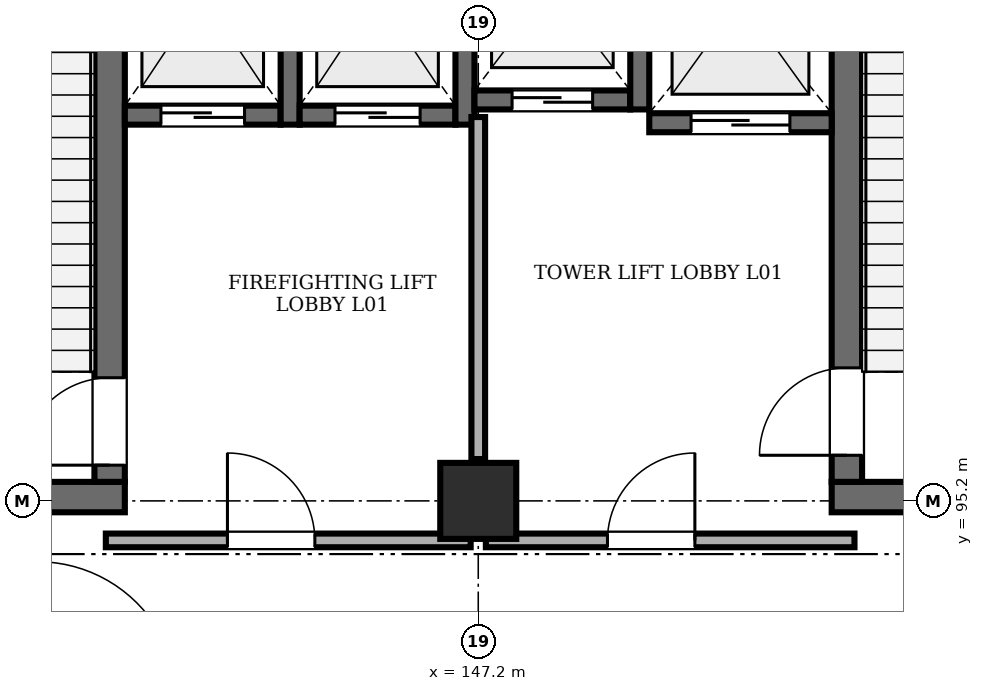
"""IFC4 building model, lengths in metres.
Left out: names, types, materials, properties, quantities, classifications, styles, units other than length and angle.
Written with IfcOpenShell. Run it as: python <this file> out.ifc"""

import sys

from ifc_helpers import new_model, si_unit, direction, frame, frame_2d, origin, origin_2d, place, context, subcontext, project, spatial, rectangle, extrude, element, fill, save


model = new_model("IFC4")
c1 = context("Model", 3, precision=1e-05, world=origin(), true_north=direction((0.0, 1.0)))
c2 = subcontext(c1, "Body", "Model", "MODEL_VIEW")
j1 = project(units=[si_unit("LENGTHUNIT", "METRE"), si_unit("PLANEANGLEUNIT", "RADIAN")], contexts=[c1])
p1 = place(None, origin())
s1 = spatial("IfcSite", under=j1, at=p1, CompositionType="ELEMENT")
p2 = place(p1, origin())
s2 = spatial("IfcBuilding", under=s1, at=p2, CompositionType="ELEMENT")
p3 = place(p2, origin())
s3 = spatial("IfcBuildingStorey", under=s2, at=p3, CompositionType="ELEMENT", Elevation=0.0)
p4 = place(p3, frame((147.2, 95.2, 0.0), z_axis=(0.0, 0.0, 1.0), x_axis=(1.0, 0.0, 0.0)))
e1 = element("IfcColumn", 1, at=p4, inside=s3, PredefinedType="COLUMN", context=c2, shape_type="SweptSolid", body=[
    extrude(rectangle(XDim=1.0, YDim=1.0, at=origin_2d()), origin(), (0.0, 0.0, 1.0), 5.18),
])
p5 = place(p3, frame((138.65, 95.25, 0.0), z_axis=(0.0, 0.0, 1.0), x_axis=(1.0, 0.0, 0.0)))
e2 = element("IfcWall", 2, at=p5, inside=s3, PredefinedType="SHEAR", context=c2, shape_type="SweptSolid", body=[
    extrude(rectangle(XDim=3.9, YDim=0.4, at=frame_2d((1.95, 0.0))), origin(), (0.0, 0.0, 1.0), 5.18),
])
p6 = place(p3, frame((142.35, 95.45, 0.0), z_axis=(0.0, 0.0, 1.0), x_axis=(0.0, 1.0, 0.0)))
e3 = element("IfcWall", 3, at=p6, inside=s3, PredefinedType="SHEAR", context=c2, shape_type="SweptSolid", body=[
    extrude(rectangle(XDim=7.9, YDim=0.4, at=frame_2d((3.95, 0.0))), origin(), (0.0, 0.0, 1.0), 5.18),
])
p7 = place(p6, frame((0.22, 0.0, 0.0)))
e4 = element("IfcOpeningElement", 4, at=p7, cuts=e3, PredefinedType="OPENING", context=c2, shape_type="SweptSolid", body=[
    extrude(rectangle(XDim=1.15, YDim=2.15, at=frame_2d((0.575, 1.075))), frame((0.0, 0.21, 0.0), z_axis=(0.0, -1.0, 0.0), x_axis=(1.0, 0.0, 0.0)), (0.0, 0.0, 1.0), 0.42),
])
p8 = place(p3, frame((151.85, 95.25, 0.0), z_axis=(0.0, 0.0, 1.0), x_axis=(1.0, 0.0, 0.0)))
e5 = element("IfcWall", 5, at=p8, inside=s3, PredefinedType="SHEAR", context=c2, shape_type="SweptSolid", body=[
    extrude(rectangle(XDim=3.9, YDim=0.4, at=frame_2d((1.95, 0.0))), origin(), (0.0, 0.0, 1.0), 5.18),
])
p9 = place(p3, frame((152.05, 95.45, 0.0), z_axis=(0.0, 0.0, 1.0), x_axis=(0.0, 1.0, 0.0)))
e6 = element("IfcWall", 6, at=p9, inside=s3, PredefinedType="SHEAR", context=c2, shape_type="SweptSolid", body=[
    extrude(rectangle(XDim=7.9, YDim=0.4, at=frame_2d((3.95, 0.0))), origin(), (0.0, 0.0, 1.0), 5.18),
])
p10 = place(p9, frame((0.35, 0.0, 0.0)))
e7 = element("IfcOpeningElement", 7, at=p10, cuts=e6, PredefinedType="OPENING", context=c2, shape_type="SweptSolid", body=[
    extrude(rectangle(XDim=1.15, YDim=2.15, at=frame_2d((0.575, 1.075))), frame((0.0, 0.21, 0.0), z_axis=(0.0, -1.0, 0.0), x_axis=(1.0, 0.0, 0.0)), (0.0, 0.0, 1.0), 0.42),
])
p11 = place(p3, frame((142.55, 100.275, 0.0), z_axis=(0.0, 0.0, 1.0), x_axis=(1.0, 0.0, 0.0)))
e8 = element("IfcWall", 8, at=p11, inside=s3, PredefinedType="SHEAR", context=c2, shape_type="SweptSolid", body=[
    extrude(rectangle(XDim=2.05, YDim=0.25, at=frame_2d((1.025, 0.0))), origin(), (0.0, 0.0, 1.0), 5.18),
])
p12 = place(p11, frame((0.475, 0.0, 0.0)))
e9 = element("IfcOpeningElement", 9, at=p12, cuts=e8, PredefinedType="OPENING", context=c2, shape_type="SweptSolid", body=[
    extrude(rectangle(XDim=1.1, YDim=2.15, at=frame_2d((0.55, 1.075))), frame((0.0, 0.135, 0.0), z_axis=(0.0, -1.0, 0.0), x_axis=(1.0, 0.0, 0.0)), (0.0, 0.0, 1.0), 0.27),
])
p13 = place(p3, frame((144.725, 100.15, 0.0), z_axis=(0.0, 0.0, 1.0), x_axis=(0.0, 1.0, 0.0)))
e10 = element("IfcWall", 10, at=p13, inside=s3, PredefinedType="SHEAR", context=c2, shape_type="SweptSolid", body=[
    extrude(rectangle(XDim=3.4, YDim=0.25, at=frame_2d((1.7, 0.0))), origin(), (0.0, 0.0, 1.0), 5.18),
])
p14 = place(p3, frame((144.85, 100.275, 0.0), z_axis=(0.0, 0.0, 1.0), x_axis=(1.0, 0.0, 0.0)))
e11 = element("IfcWall", 11, at=p14, inside=s3, PredefinedType="SHEAR", context=c2, shape_type="SweptSolid", body=[
    extrude(rectangle(XDim=2.05, YDim=0.25, at=frame_2d((1.025, 0.0))), origin(), (0.0, 0.0, 1.0), 5.18),
])
p15 = place(p14, frame((0.465, 0.0, 0.0)))
e12 = element("IfcOpeningElement", 12, at=p15, cuts=e11, PredefinedType="OPENING", context=c2, shape_type="SweptSolid", body=[
    extrude(rectangle(XDim=1.12, YDim=2.15, at=frame_2d((0.56, 1.075))), frame((0.0, 0.135, 0.0), z_axis=(0.0, -1.0, 0.0), x_axis=(1.0, 0.0, 0.0)), (0.0, 0.0, 1.0), 0.27),
])
p16 = place(p3, frame((147.025, 100.15, 0.0), z_axis=(0.0, 0.0, 1.0), x_axis=(0.0, 1.0, 0.0)))
e13 = element("IfcWall", 13, at=p16, inside=s3, PredefinedType="SHEAR", context=c2, shape_type="SweptSolid", body=[
    extrude(rectangle(XDim=3.4, YDim=0.25, at=frame_2d((1.7, 0.0))), origin(), (0.0, 0.0, 1.0), 5.18),
])
p17 = place(p3, frame((147.15, 100.475, 0.0), z_axis=(0.0, 0.0, 1.0), x_axis=(1.0, 0.0, 0.0)))
e14 = element("IfcWall", 14, at=p17, inside=s3, PredefinedType="SHEAR", context=c2, shape_type="SweptSolid", body=[
    extrude(rectangle(XDim=2.05, YDim=0.25, at=frame_2d((1.025, 0.0))), origin(), (0.0, 0.0, 1.0), 5.18),
])
p18 = place(p17, frame((0.495, 0.0, 0.0)))
e15 = element("IfcOpeningElement", 15, at=p18, cuts=e14, PredefinedType="OPENING", context=c2, shape_type="SweptSolid", body=[
    extrude(rectangle(XDim=1.06, YDim=2.15, at=frame_2d((0.53, 1.075))), frame((0.0, 0.135, 0.0), z_axis=(0.0, -1.0, 0.0), x_axis=(1.0, 0.0, 0.0)), (0.0, 0.0, 1.0), 0.27),
])
p19 = place(p3, frame((149.325, 100.35, 0.0), z_axis=(0.0, 0.0, 1.0), x_axis=(0.0, 1.0, 0.0)))
e16 = element("IfcWall", 16, at=p19, inside=s3, PredefinedType="SHEAR", context=c2, shape_type="SweptSolid", body=[
    extrude(rectangle(XDim=3.2, YDim=0.25, at=frame_2d((1.6, 0.0))), origin(), (0.0, 0.0, 1.0), 5.18),
])
p20 = place(p3, frame((149.45, 100.175, 0.0), z_axis=(0.0, 0.0, 1.0), x_axis=(1.0, 0.0, 0.0)))
e17 = element("IfcWall", 17, at=p20, inside=s3, PredefinedType="SHEAR", context=c2, shape_type="SweptSolid", body=[
    extrude(rectangle(XDim=2.4, YDim=0.25, at=frame_2d((1.2, 0.0))), origin(), (0.0, 0.0, 1.0), 5.18),
])
p21 = place(p20, frame((0.55, 0.0, 0.0)))
e18 = element("IfcOpeningElement", 18, at=p21, cuts=e17, PredefinedType="OPENING", context=c2, shape_type="SweptSolid", body=[
    extrude(rectangle(XDim=1.3, YDim=2.25, at=frame_2d((0.65, 1.125))), frame((0.0, 0.135, 0.0), z_axis=(0.0, -1.0, 0.0), x_axis=(1.0, 0.0, 0.0)), (0.0, 0.0, 1.0), 0.27),
])
p22 = place(p3, frame((142.3, 94.68, 0.0), z_axis=(0.0, 0.0, 1.0), x_axis=(1.0, 0.0, 0.0)))
e19 = element("IfcWall", 19, at=p22, inside=s3, PredefinedType="STANDARD", context=c2, shape_type="SweptSolid", body=[
    extrude(rectangle(XDim=4.8, YDim=0.18, at=frame_2d((2.4, 0.0))), origin(), (0.0, 0.0, 1.0), 5.18),
])
p23 = place(p22, frame((1.6, 0.0, 0.0)))
e20 = element("IfcOpeningElement", 20, at=p23, cuts=e19, PredefinedType="OPENING", context=c2, shape_type="SweptSolid", body=[
    extrude(rectangle(XDim=1.15, YDim=2.15, at=frame_2d((0.575, 1.075))), frame((0.0, 0.1, 0.0), z_axis=(0.0, -1.0, 0.0), x_axis=(1.0, 0.0, 0.0)), (0.0, 0.0, 1.0), 0.2),
])
p24 = place(p3, frame((147.3, 94.68, 0.0), z_axis=(0.0, 0.0, 1.0), x_axis=(1.0, 0.0, 0.0)))
e21 = element("IfcWall", 21, at=p24, inside=s3, PredefinedType="STANDARD", context=c2, shape_type="SweptSolid", body=[
    extrude(rectangle(XDim=4.85, YDim=0.18, at=frame_2d((2.425, 0.0))), origin(), (0.0, 0.0, 1.0), 5.18),
])
p25 = place(p24, frame((1.6, 0.0, 0.0)))
e22 = element("IfcOpeningElement", 22, at=p25, cuts=e21, PredefinedType="OPENING", context=c2, shape_type="SweptSolid", body=[
    extrude(rectangle(XDim=1.15, YDim=2.15, at=frame_2d((0.575, 1.075))), frame((0.0, 0.1, 0.0), z_axis=(0.0, -1.0, 0.0), x_axis=(1.0, 0.0, 0.0)), (0.0, 0.0, 1.0), 0.2),
])
p26 = place(p3, frame((147.2, 95.75, 0.0), z_axis=(0.0, 0.0, 1.0), x_axis=(0.0, 1.0, 0.0)))
e23 = element("IfcWall", 23, at=p26, inside=s3, PredefinedType="STANDARD", context=c2, shape_type="SweptSolid", body=[
    extrude(rectangle(XDim=4.5, YDim=0.18, at=frame_2d((2.25, 0.0))), origin(), (0.0, 0.0, 1.0), 4.43),
])
p27 = place(p23, origin())
e24 = element("IfcDoor", 24, at=p27, inside=s3, OperationType="SINGLE_SWING_LEFT", PredefinedType="DOOR", context=c2, shape_type="SweptSolid", body=[
    extrude(rectangle(XDim=1.15, YDim=2.15, at=frame_2d((0.575, 1.075))), frame((0.0, 0.025, 0.0), z_axis=(0.0, -1.0, 0.0), x_axis=(1.0, 0.0, 0.0)), (0.0, 0.0, 1.0), 0.05),
])
fill(e20, e24)
p28 = place(p25, origin())
e25 = element("IfcDoor", 25, at=p28, inside=s3, OperationType="SINGLE_SWING_RIGHT", PredefinedType="DOOR", context=c2, shape_type="SweptSolid", body=[
    extrude(rectangle(XDim=1.15, YDim=2.15, at=frame_2d((0.575, 1.075))), frame((0.0, 0.025, 0.0), z_axis=(0.0, -1.0, 0.0), x_axis=(1.0, 0.0, 0.0)), (0.0, 0.0, 1.0), 0.05),
])
fill(e22, e25)
p29 = place(p7, origin())
e26 = element("IfcDoor", 26, at=p29, inside=s3, OperationType="SINGLE_SWING_LEFT", PredefinedType="DOOR", context=c2, shape_type="SweptSolid", body=[
    extrude(rectangle(XDim=1.15, YDim=2.15, at=frame_2d((0.575, 1.075))), frame((0.0, 0.025, 0.0), z_axis=(0.0, -1.0, 0.0), x_axis=(1.0, 0.0, 0.0)), (0.0, 0.0, 1.0), 0.05),
])
fill(e4, e26)
p30 = place(p10, origin())
e27 = element("IfcDoor", 27, at=p30, inside=s3, OperationType="SINGLE_SWING_LEFT", PredefinedType="DOOR", context=c2, shape_type="SweptSolid", body=[
    extrude(rectangle(XDim=1.15, YDim=2.15, at=frame_2d((0.575, 1.075))), frame((0.0, 0.025, 0.0), z_axis=(0.0, -1.0, 0.0), x_axis=(1.0, 0.0, 0.0)), (0.0, 0.0, 1.0), 0.05),
])
fill(e7, e27)
p31 = place(p12, origin())
e28 = element("IfcDoor", 28, at=p31, inside=s3, OperationType="SLIDING_TO_LEFT", PredefinedType="DOOR", context=c2, shape_type="SweptSolid", body=[
    extrude(rectangle(XDim=1.1, YDim=2.15, at=frame_2d((0.55, 1.075))), frame((0.0, 0.025, 0.0), z_axis=(0.0, -1.0, 0.0), x_axis=(1.0, 0.0, 0.0)), (0.0, 0.0, 1.0), 0.05),
])
fill(e9, e28)
p32 = place(p15, origin())
e29 = element("IfcDoor", 29, at=p32, inside=s3, OperationType="SLIDING_TO_LEFT", PredefinedType="DOOR", context=c2, shape_type="SweptSolid", body=[
    extrude(rectangle(XDim=1.12, YDim=2.15, at=frame_2d((0.56, 1.075))), frame((0.0, 0.025, 0.0), z_axis=(0.0, -1.0, 0.0), x_axis=(1.0, 0.0, 0.0)), (0.0, 0.0, 1.0), 0.05),
])
fill(e12, e29)
p33 = place(p18, origin())
e30 = element("IfcDoor", 30, at=p33, inside=s3, OperationType="SLIDING_TO_LEFT", PredefinedType="DOOR", context=c2, shape_type="SweptSolid", body=[
    extrude(rectangle(XDim=1.06, YDim=2.15, at=frame_2d((0.53, 1.075))), frame((0.0, 0.025, 0.0), z_axis=(0.0, -1.0, 0.0), x_axis=(1.0, 0.0, 0.0)), (0.0, 0.0, 1.0), 0.05),
])
fill(e15, e30)
p34 = place(p21, origin())
e31 = element("IfcDoor", 31, at=p34, inside=s3, OperationType="SLIDING_TO_LEFT", PredefinedType="DOOR", context=c2, shape_type="SweptSolid", body=[
    extrude(rectangle(XDim=1.3, YDim=2.25, at=frame_2d((0.65, 1.125))), frame((0.0, 0.025, 0.0), z_axis=(0.0, -1.0, 0.0), x_axis=(1.0, 0.0, 0.0)), (0.0, 0.0, 1.0), 0.05),
])
fill(e18, e31)
save(model, sys.argv[1])
